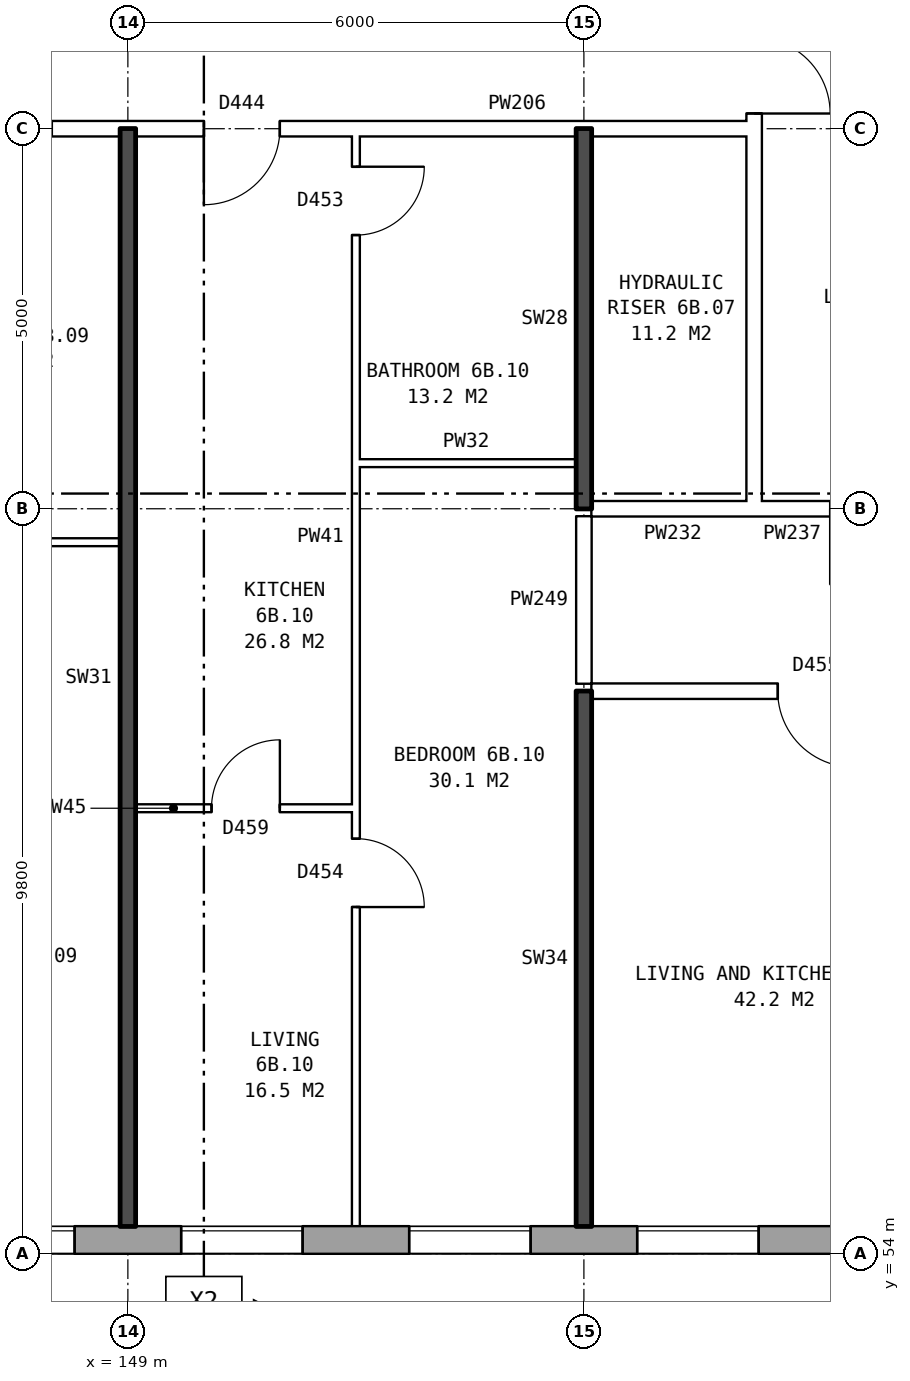
"""IFC4 building model, lengths in metres.
Left out: names, types, materials, properties, quantities, classifications, styles, units other than length and angle.
Written with IfcOpenShell. Run it as: python <this file> out.ifc"""

import sys

from ifc_helpers import new_model, si_unit, direction, frame, frame_2d, origin, place, context, subcontext, project, spatial, rectangle, extrude, element, fill, save


model = new_model("IFC4")
c1 = context("Model", 3, precision=1e-05, world=origin(), true_north=direction((0.0, 1.0)))
c2 = subcontext(c1, "Body", "Model", "MODEL_VIEW")
j1 = project(units=[si_unit("LENGTHUNIT", "METRE"), si_unit("PLANEANGLEUNIT", "RADIAN")], contexts=[c1])
p1 = place(None, origin())
s1 = spatial("IfcSite", under=j1, at=p1, CompositionType="ELEMENT")
p2 = place(p1, origin())
s2 = spatial("IfcBuilding", under=s1, at=p2, CompositionType="ELEMENT")
p3 = place(p2, frame((0.0, 0.0, 25.7)))
s3 = spatial("IfcBuildingStorey", under=s2, at=p3, CompositionType="ELEMENT", Elevation=25.7)
p4 = place(p3, frame((134.075, 54.18, 0.0), z_axis=(0.0, 0.0, 1.0), x_axis=(1.0, 0.0, 0.0)))
e1 = element("IfcWall", 1, at=p4, inside=s3, PredefinedType="STANDARD", context=c2, shape_type="SweptSolid", body=[
    extrude(rectangle(XDim=40.601, YDim=0.36, at=frame_2d((20.3, 0.0))), origin(), (0.0, 0.0, 1.0), 2.85),
])
p5 = place(p4, frame((0.625, 0.0, 0.8)))
e2 = element("IfcOpeningElement", 2, at=p5, cuts=e1, PredefinedType="OPENING", context=c2, shape_type="SweptSolid", body=[
    extrude(rectangle(XDim=1.6, YDim=1.8, at=frame_2d((0.8, 0.9))), frame((0.0, 0.19, 0.0), z_axis=(0.0, -1.0, 0.0), x_axis=(1.0, 0.0, 0.0)), (0.0, 0.0, 1.0), 0.38),
])
p6 = place(p4, frame((3.625, 0.0, 0.8)))
e3 = element("IfcOpeningElement", 3, at=p6, cuts=e1, PredefinedType="OPENING", context=c2, shape_type="SweptSolid", body=[
    extrude(rectangle(XDim=1.6, YDim=1.8, at=frame_2d((0.8, 0.9))), frame((0.0, 0.19, 0.0), z_axis=(0.0, -1.0, 0.0), x_axis=(1.0, 0.0, 0.0)), (0.0, 0.0, 1.0), 0.38),
])
p7 = place(p4, frame((5.525, 0.0, 1.7)))
e4 = element("IfcOpeningElement", 4, at=p7, cuts=e1, PredefinedType="OPENING", context=c2, shape_type="SweptSolid", body=[
    extrude(rectangle(XDim=1.2, YDim=0.9, at=frame_2d((0.6, 0.45))), frame((0.0, 0.19, 0.0), z_axis=(0.0, -1.0, 0.0), x_axis=(1.0, 0.0, 0.0)), (0.0, 0.0, 1.0), 0.38),
])
p8 = place(p4, frame((9.625, 0.0, 0.8)))
e5 = element("IfcOpeningElement", 5, at=p8, cuts=e1, PredefinedType="OPENING", context=c2, shape_type="SweptSolid", body=[
    extrude(rectangle(XDim=1.6, YDim=1.8, at=frame_2d((0.8, 0.9))), frame((0.0, 0.19, 0.0), z_axis=(0.0, -1.0, 0.0), x_axis=(1.0, 0.0, 0.0)), (0.0, 0.0, 1.0), 0.38),
])
p9 = place(p4, frame((12.625, 0.0, 0.8)))
e6 = element("IfcOpeningElement", 6, at=p9, cuts=e1, PredefinedType="OPENING", context=c2, shape_type="SweptSolid", body=[
    extrude(rectangle(XDim=1.6, YDim=1.8, at=frame_2d((0.8, 0.9))), frame((0.0, 0.19, 0.0), z_axis=(0.0, -1.0, 0.0), x_axis=(1.0, 0.0, 0.0)), (0.0, 0.0, 1.0), 0.38),
])
p10 = place(p4, frame((15.625, 0.0, 0.8)))
e7 = element("IfcOpeningElement", 7, at=p10, cuts=e1, PredefinedType="OPENING", context=c2, shape_type="SweptSolid", body=[
    extrude(rectangle(XDim=1.6, YDim=1.8, at=frame_2d((0.8, 0.9))), frame((0.0, 0.19, 0.0), z_axis=(0.0, -1.0, 0.0), x_axis=(1.0, 0.0, 0.0)), (0.0, 0.0, 1.0), 0.38),
])
p11 = place(p4, frame((18.625, 0.0, 0.8)))
e8 = element("IfcOpeningElement", 8, at=p11, cuts=e1, PredefinedType="OPENING", context=c2, shape_type="SweptSolid", body=[
    extrude(rectangle(XDim=1.6, YDim=1.8, at=frame_2d((0.8, 0.9))), frame((0.0, 0.19, 0.0), z_axis=(0.0, -1.0, 0.0), x_axis=(1.0, 0.0, 0.0)), (0.0, 0.0, 1.0), 0.38),
])
p12 = place(p4, frame((21.625, 0.0, 0.8)))
e9 = element("IfcOpeningElement", 9, at=p12, cuts=e1, PredefinedType="OPENING", context=c2, shape_type="SweptSolid", body=[
    extrude(rectangle(XDim=1.6, YDim=1.8, at=frame_2d((0.8, 0.9))), frame((0.0, 0.19, 0.0), z_axis=(0.0, -1.0, 0.0), x_axis=(1.0, 0.0, 0.0)), (0.0, 0.0, 1.0), 0.38),
])
p13 = place(p4, frame((24.625, 0.0, 0.8)))
e10 = element("IfcOpeningElement", 10, at=p13, cuts=e1, PredefinedType="OPENING", context=c2, shape_type="SweptSolid", body=[
    extrude(rectangle(XDim=1.6, YDim=1.8, at=frame_2d((0.8, 0.9))), frame((0.0, 0.19, 0.0), z_axis=(0.0, -1.0, 0.0), x_axis=(1.0, 0.0, 0.0)), (0.0, 0.0, 1.0), 0.38),
])
p14 = place(p4, frame((27.625, 0.0, 0.8)))
e11 = element("IfcOpeningElement", 11, at=p14, cuts=e1, PredefinedType="OPENING", context=c2, shape_type="SweptSolid", body=[
    extrude(rectangle(XDim=1.6, YDim=1.8, at=frame_2d((0.8, 0.9))), frame((0.0, 0.19, 0.0), z_axis=(0.0, -1.0, 0.0), x_axis=(1.0, 0.0, 0.0)), (0.0, 0.0, 1.0), 0.38),
])
p15 = place(p4, frame((30.125, 0.0, 0.8)))
e12 = element("IfcOpeningElement", 12, at=p15, cuts=e1, PredefinedType="OPENING", context=c2, shape_type="SweptSolid", body=[
    extrude(rectangle(XDim=1.2, YDim=1.8, at=frame_2d((0.6, 0.9))), frame((0.0, 0.19, 0.0), z_axis=(0.0, -1.0, 0.0), x_axis=(1.0, 0.0, 0.0)), (0.0, 0.0, 1.0), 0.38),
])
p16 = place(p4, frame((33.825, 0.0, 1.7)))
e13 = element("IfcOpeningElement", 13, at=p16, cuts=e1, PredefinedType="OPENING", context=c2, shape_type="SweptSolid", body=[
    extrude(rectangle(XDim=1.0, YDim=0.9, at=frame_2d((0.5, 0.45))), frame((0.0, 0.19, 0.0), z_axis=(0.0, -1.0, 0.0), x_axis=(1.0, 0.0, 0.0)), (0.0, 0.0, 1.0), 0.38),
])
p17 = place(p4, frame((36.625, 0.0, 0.8)))
e14 = element("IfcOpeningElement", 14, at=p17, cuts=e1, PredefinedType="OPENING", context=c2, shape_type="SweptSolid", body=[
    extrude(rectangle(XDim=1.6, YDim=1.8, at=frame_2d((0.8, 0.9))), frame((0.0, 0.19, 0.0), z_axis=(0.0, -1.0, 0.0), x_axis=(1.0, 0.0, 0.0)), (0.0, 0.0, 1.0), 0.38),
])
p18 = place(p4, frame((8.025, 0.0, 0.8)))
e15 = element("IfcOpeningElement", 15, at=p18, cuts=e1, PredefinedType="OPENING", context=c2, shape_type="SweptSolid", body=[
    extrude(rectangle(XDim=0.6, YDim=0.9, at=frame_2d((0.3, 0.45))), frame((0.0, 0.19, 0.0), z_axis=(0.0, -1.0, 0.0), x_axis=(1.0, 0.0, 0.0)), (0.0, 0.0, 1.0), 0.38),
])
p19 = place(p4, frame((31.625, 0.0, 0.8)))
e16 = element("IfcOpeningElement", 16, at=p19, cuts=e1, PredefinedType="OPENING", context=c2, shape_type="SweptSolid", body=[
    extrude(rectangle(XDim=0.6, YDim=1.2, at=frame_2d((0.3, 0.6))), frame((0.0, 0.19, 0.0), z_axis=(0.0, -1.0, 0.0), x_axis=(1.0, 0.0, 0.0)), (0.0, 0.0, 1.0), 0.38),
])
p20 = place(p4, frame((35.125, 0.0, 0.8)))
e17 = element("IfcOpeningElement", 17, at=p20, cuts=e1, PredefinedType="OPENING", context=c2, shape_type="SweptSolid", body=[
    extrude(rectangle(XDim=1.2, YDim=1.8, at=frame_2d((0.6, 0.9))), frame((0.0, 0.19, 0.0), z_axis=(0.0, -1.0, 0.0), x_axis=(1.0, 0.0, 0.0)), (0.0, 0.0, 1.0), 0.38),
])
p21 = place(p3, frame((157.24, 63.9, 0.0), z_axis=(0.0, 0.0, 1.0), x_axis=(0.0, 1.0, 0.0)))
e18 = element("IfcWall", 18, at=p21, inside=s3, PredefinedType="PARTITIONING", context=c2, shape_type="SweptSolid", body=[
    extrude(rectangle(XDim=12.2, YDim=0.2, at=frame_2d((6.1, 0.0))), origin(), (0.0, 0.0, 1.0), 2.85),
])
p22 = place(p21, frame((5.1, 0.0, 0.0)))
e19 = element("IfcOpeningElement", 19, at=p22, cuts=e18, PredefinedType="OPENING", context=c2, shape_type="SweptSolid", body=[
    extrude(rectangle(XDim=2.0, YDim=2.1, at=frame_2d((1.0, 1.05))), frame((0.0, 0.11, 0.0), z_axis=(0.0, -1.0, 0.0), x_axis=(1.0, 0.0, 0.0)), (0.0, 0.0, 1.0), 0.22),
])
p23 = place(p3, frame((149.1, 59.86, 0.0), z_axis=(0.0, 0.0, 1.0), x_axis=(1.0, 0.0, 0.0)))
e20 = element("IfcWall", 20, at=p23, inside=s3, PredefinedType="PARTITIONING", context=c2, shape_type="SweptSolid", body=[
    extrude(rectangle(XDim=2.9, YDim=0.1, at=frame_2d((1.45, 0.0))), origin(), (0.0, 0.0, 1.0), 2.85),
])
p24 = place(p23, frame((1.0, 0.0, 0.0)))
e21 = element("IfcOpeningElement", 21, at=p24, cuts=e20, PredefinedType="OPENING", context=c2, shape_type="SweptSolid", body=[
    extrude(rectangle(XDim=0.9, YDim=2.1, at=frame_2d((0.45, 1.05))), frame((0.0, 0.06, 0.0), z_axis=(0.0, -1.0, 0.0), x_axis=(1.0, 0.0, 0.0)), (0.0, 0.0, 1.0), 0.12),
])
p25 = place(p3, frame((155.1, 61.4, 0.0), z_axis=(0.0, 0.0, 1.0), x_axis=(1.0, 0.0, 0.0)))
e22 = element("IfcWall", 22, at=p25, inside=s3, PredefinedType="PARTITIONING", context=c2, shape_type="SweptSolid", body=[
    extrude(rectangle(XDim=22.29, YDim=0.2, at=frame_2d((11.145, 0.0))), origin(), (0.0, 0.0, 1.0), 2.85),
])
p26 = place(p25, frame((2.45, 0.0, 0.0)))
e23 = element("IfcOpeningElement", 23, at=p26, cuts=e22, PredefinedType="OPENING", context=c2, shape_type="SweptSolid", body=[
    extrude(rectangle(XDim=1.0, YDim=2.1, at=frame_2d((0.5, 1.05))), frame((0.0, 0.11, 0.0), z_axis=(0.0, -1.0, 0.0), x_axis=(1.0, 0.0, 0.0)), (0.0, 0.0, 1.0), 0.22),
])
p27 = place(p25, frame((14.4, 0.0, 0.0)))
e24 = element("IfcOpeningElement", 24, at=p27, cuts=e22, PredefinedType="OPENING", context=c2, shape_type="SweptSolid", body=[
    extrude(rectangle(XDim=1.0, YDim=2.1, at=frame_2d((0.5, 1.05))), frame((0.0, 0.11, 0.0), z_axis=(0.0, -1.0, 0.0), x_axis=(1.0, 0.0, 0.0)), (0.0, 0.0, 1.0), 0.22),
])
p28 = place(p3, frame((146.0, 63.36, 0.0), z_axis=(0.0, 0.0, 1.0), x_axis=(1.0, 0.0, 0.0)))
e25 = element("IfcWall", 25, at=p28, inside=s3, PredefinedType="PARTITIONING", context=c2, shape_type="SweptSolid", body=[
    extrude(rectangle(XDim=2.9, YDim=0.1, at=frame_2d((1.45, 0.0))), origin(), (0.0, 0.0, 1.0), 2.85),
])
p29 = place(p28, frame((1.0, 0.0, 0.0)))
e26 = element("IfcOpeningElement", 26, at=p29, cuts=e25, PredefinedType="OPENING", context=c2, shape_type="SweptSolid", body=[
    extrude(rectangle(XDim=0.9, YDim=2.1, at=frame_2d((0.45, 1.05))), frame((0.0, 0.06, 0.0), z_axis=(0.0, -1.0, 0.0), x_axis=(1.0, 0.0, 0.0)), (0.0, 0.0, 1.0), 0.12),
])
p30 = place(p3, frame((155.1, 63.8, 0.0), z_axis=(0.0, 0.0, 1.0), x_axis=(1.0, 0.0, 0.0)))
e27 = element("IfcWall", 27, at=p30, inside=s3, PredefinedType="PARTITIONING", context=c2, shape_type="SweptSolid", body=[
    extrude(rectangle(XDim=2.14, YDim=0.2, at=frame_2d((1.07, 0.0))), origin(), (0.0, 0.0, 1.0), 2.85),
])
p31 = place(p3, frame((157.24, 63.8, 0.0), z_axis=(0.0, 0.0, 1.0), x_axis=(1.0, 0.0, 0.0)))
e28 = element("IfcWall", 28, at=p31, inside=s3, PredefinedType="PARTITIONING", context=c2, shape_type="SweptSolid", body=[
    extrude(rectangle(XDim=3.0, YDim=0.2, at=frame_2d((1.5, 0.0))), origin(), (0.0, 0.0, 1.0), 2.85),
])
p32 = place(p31, frame((1.0, 0.0, 0.0)))
e29 = element("IfcOpeningElement", 29, at=p32, cuts=e28, PredefinedType="OPENING", context=c2, shape_type="SweptSolid", body=[
    extrude(rectangle(XDim=1.0, YDim=2.1, at=frame_2d((0.5, 1.05))), frame((0.0, 0.11, 0.0), z_axis=(0.0, -1.0, 0.0), x_axis=(1.0, 0.0, 0.0)), (0.0, 0.0, 1.0), 0.22),
])
p33 = place(p3, frame((152.0, 64.4, 0.0), z_axis=(0.0, 0.0, 1.0), x_axis=(1.0, 0.0, 0.0)))
e30 = element("IfcWall", 30, at=p33, inside=s3, PredefinedType="PARTITIONING", context=c2, shape_type="SweptSolid", body=[
    extrude(rectangle(XDim=2.9, YDim=0.1, at=frame_2d((1.45, 0.0))), origin(), (0.0, 0.0, 1.0), 2.85),
])
p34 = place(p3, frame((142.76, 68.8, 0.0), z_axis=(0.0, 0.0, 1.0), x_axis=(1.0, 0.0, 0.0)))
e31 = element("IfcWall", 31, at=p34, inside=s3, PredefinedType="PARTITIONING", context=c2, shape_type="SweptSolid", body=[
    extrude(rectangle(XDim=14.48, YDim=0.2, at=frame_2d((7.24, 0.0))), origin(), (0.0, 0.0, 1.0), 2.85),
])
p35 = place(p34, frame((4.24, 0.0, 0.0)))
e32 = element("IfcOpeningElement", 32, at=p35, cuts=e31, PredefinedType="OPENING", context=c2, shape_type="SweptSolid", body=[
    extrude(rectangle(XDim=1.0, YDim=2.1, at=frame_2d((0.5, 1.05))), frame((0.0, 0.11, 0.0), z_axis=(0.0, -1.0, 0.0), x_axis=(1.0, 0.0, 0.0)), (0.0, 0.0, 1.0), 0.22),
])
p36 = place(p34, frame((7.24, 0.0, 0.0)))
e33 = element("IfcOpeningElement", 33, at=p36, cuts=e31, PredefinedType="OPENING", context=c2, shape_type="SweptSolid", body=[
    extrude(rectangle(XDim=1.0, YDim=2.1, at=frame_2d((0.5, 1.05))), frame((0.0, 0.11, 0.0), z_axis=(0.0, -1.0, 0.0), x_axis=(1.0, 0.0, 0.0)), (0.0, 0.0, 1.0), 0.22),
])
p37 = place(p3, frame((149.0, 54.36, 0.0), z_axis=(0.0, 0.0, 1.0), x_axis=(0.0, 1.0, 0.0)))
e34 = element("IfcWall", 34, at=p37, inside=s3, PredefinedType="SOLIDWALL", context=c2, shape_type="SweptSolid", body=[
    extrude(rectangle(XDim=14.44, YDim=0.2, at=frame_2d((7.22, 0.0))), origin(), (0.0, 0.0, 1.0), 2.85),
])
p38 = place(p3, frame((152.0, 54.36, 0.0), z_axis=(0.0, 0.0, 1.0), x_axis=(0.0, 1.0, 0.0)))
e35 = element("IfcWall", 35, at=p38, inside=s3, PredefinedType="PARTITIONING", context=c2, shape_type="SweptSolid", body=[
    extrude(rectangle(XDim=14.34, YDim=0.1, at=frame_2d((7.17, 0.0))), origin(), (0.0, 0.0, 1.0), 2.85),
])
p39 = place(p38, frame((4.2, 0.0, 0.0)))
e36 = element("IfcOpeningElement", 36, at=p39, cuts=e35, PredefinedType="OPENING", context=c2, shape_type="SweptSolid", body=[
    extrude(rectangle(XDim=0.9, YDim=2.1, at=frame_2d((0.45, 1.05))), frame((0.0, 0.06, 0.0), z_axis=(0.0, -1.0, 0.0), x_axis=(1.0, 0.0, 0.0)), (0.0, 0.0, 1.0), 0.12),
])
p40 = place(p38, frame((13.04, 0.0, 0.0)))
e37 = element("IfcOpeningElement", 37, at=p40, cuts=e35, PredefinedType="OPENING", context=c2, shape_type="SweptSolid", body=[
    extrude(rectangle(XDim=0.9, YDim=2.1, at=frame_2d((0.45, 1.05))), frame((0.0, 0.06, 0.0), z_axis=(0.0, -1.0, 0.0), x_axis=(1.0, 0.0, 0.0)), (0.0, 0.0, 1.0), 0.12),
])
p41 = place(p3, frame((155.0, 54.36, 0.0), z_axis=(0.0, 0.0, 1.0), x_axis=(0.0, 1.0, 0.0)))
e38 = element("IfcWall", 38, at=p41, inside=s3, PredefinedType="SOLIDWALL", context=c2, shape_type="SweptSolid", body=[
    extrude(rectangle(XDim=7.04, YDim=0.2, at=frame_2d((3.52, 0.0))), origin(), (0.0, 0.0, 1.0), 2.85),
])
p42 = place(p3, frame((155.0, 61.5, 0.0), z_axis=(0.0, 0.0, 1.0), x_axis=(0.0, 1.0, 0.0)))
e39 = element("IfcWall", 39, at=p42, inside=s3, PredefinedType="PARTITIONING", context=c2, shape_type="SweptSolid", body=[
    extrude(rectangle(XDim=2.2, YDim=0.2, at=frame_2d((1.1, 0.0))), origin(), (0.0, 0.0, 1.0), 2.85),
])
p43 = place(p3, frame((155.0, 63.8, 0.0), z_axis=(0.0, 0.0, 1.0), x_axis=(0.0, 1.0, 0.0)))
e40 = element("IfcWall", 40, at=p43, inside=s3, PredefinedType="SOLIDWALL", context=c2, shape_type="SweptSolid", body=[
    extrude(rectangle(XDim=5.0, YDim=0.2, at=frame_2d((2.5, 0.0))), origin(), (0.0, 0.0, 1.0), 2.85),
])
p44 = place(p9, origin())
e41 = element("IfcWindow", 41, at=p44, inside=s3, PartitioningType="SINGLE_PANEL", PredefinedType="WINDOW", context=c2, shape_type="SweptSolid", body=[
    extrude(rectangle(XDim=1.6, YDim=1.8, at=frame_2d((0.8, 0.9))), frame((0.0, 0.15, 0.0), z_axis=(0.0, -1.0, 0.0), x_axis=(1.0, 0.0, 0.0)), (0.0, 0.0, 1.0), 0.06),
])
fill(e6, e41)
p45 = place(p10, origin())
e42 = element("IfcWindow", 42, at=p45, inside=s3, PartitioningType="SINGLE_PANEL", PredefinedType="WINDOW", context=c2, shape_type="SweptSolid", body=[
    extrude(rectangle(XDim=1.6, YDim=1.8, at=frame_2d((0.8, 0.9))), frame((0.0, 0.15, 0.0), z_axis=(0.0, -1.0, 0.0), x_axis=(1.0, 0.0, 0.0)), (0.0, 0.0, 1.0), 0.06),
])
fill(e7, e42)
p46 = place(p11, origin())
e43 = element("IfcWindow", 43, at=p46, inside=s3, PartitioningType="SINGLE_PANEL", PredefinedType="WINDOW", context=c2, shape_type="SweptSolid", body=[
    extrude(rectangle(XDim=1.6, YDim=1.8, at=frame_2d((0.8, 0.9))), frame((0.0, 0.15, 0.0), z_axis=(0.0, -1.0, 0.0), x_axis=(1.0, 0.0, 0.0)), (0.0, 0.0, 1.0), 0.06),
])
fill(e8, e43)
p47 = place(p12, origin())
e44 = element("IfcWindow", 44, at=p47, inside=s3, PartitioningType="SINGLE_PANEL", PredefinedType="WINDOW", context=c2, shape_type="SweptSolid", body=[
    extrude(rectangle(XDim=1.6, YDim=1.8, at=frame_2d((0.8, 0.9))), frame((0.0, 0.15, 0.0), z_axis=(0.0, -1.0, 0.0), x_axis=(1.0, 0.0, 0.0)), (0.0, 0.0, 1.0), 0.06),
])
fill(e9, e44)
p48 = place(p22, frame((2.0, 0.0, 0.0), z_axis=(0.0, 0.0, 1.0), x_axis=(-1.0, 0.0, 0.0)))
e45 = element("IfcDoor", 45, at=p48, inside=s3, OperationType="DOUBLE_DOOR_SINGLE_SWING", PredefinedType="DOOR", context=c2, shape_type="SweptSolid", body=[
    extrude(rectangle(XDim=2.0, YDim=2.1, at=frame_2d((1.0, 1.05))), frame((0.0, 0.025, 0.0), z_axis=(0.0, -1.0, 0.0), x_axis=(1.0, 0.0, 0.0)), (0.0, 0.0, 1.0), 0.05),
])
fill(e19, e45)
p49 = place(p39, frame((0.9, 0.0, 0.0), z_axis=(0.0, 0.0, 1.0), x_axis=(-1.0, 0.0, 0.0)))
e46 = element("IfcDoor", 46, at=p49, inside=s3, OperationType="SINGLE_SWING_RIGHT", PredefinedType="DOOR", context=c2, shape_type="SweptSolid", body=[
    extrude(rectangle(XDim=0.9, YDim=2.1, at=frame_2d((0.45, 1.05))), frame((0.0, 0.025, 0.0), z_axis=(0.0, -1.0, 0.0), x_axis=(1.0, 0.0, 0.0)), (0.0, 0.0, 1.0), 0.05),
])
fill(e36, e46)
p50 = place(p36, frame((1.0, 0.0, 0.0), z_axis=(0.0, 0.0, 1.0), x_axis=(-1.0, 0.0, 0.0)))
e47 = element("IfcDoor", 47, at=p50, inside=s3, OperationType="SINGLE_SWING_RIGHT", PredefinedType="DOOR", context=c2, shape_type="SweptSolid", body=[
    extrude(rectangle(XDim=1.0, YDim=2.1, at=frame_2d((0.5, 1.05))), frame((0.0, 0.025, 0.0), z_axis=(0.0, -1.0, 0.0), x_axis=(1.0, 0.0, 0.0)), (0.0, 0.0, 1.0), 0.05),
])
fill(e33, e47)
p51 = place(p24, origin())
e48 = element("IfcDoor", 48, at=p51, inside=s3, OperationType="SINGLE_SWING_RIGHT", PredefinedType="DOOR", context=c2, shape_type="SweptSolid", body=[
    extrude(rectangle(XDim=0.9, YDim=2.1, at=frame_2d((0.45, 1.05))), frame((0.0, 0.025, 0.0), z_axis=(0.0, -1.0, 0.0), x_axis=(1.0, 0.0, 0.0)), (0.0, 0.0, 1.0), 0.05),
])
fill(e21, e48)
p52 = place(p40, frame((0.9, 0.0, 0.0), z_axis=(0.0, 0.0, 1.0), x_axis=(-1.0, 0.0, 0.0)))
e49 = element("IfcDoor", 49, at=p52, inside=s3, OperationType="SINGLE_SWING_LEFT", PredefinedType="DOOR", context=c2, shape_type="SweptSolid", body=[
    extrude(rectangle(XDim=0.9, YDim=2.1, at=frame_2d((0.45, 1.05))), frame((0.0, 0.025, 0.0), z_axis=(0.0, -1.0, 0.0), x_axis=(1.0, 0.0, 0.0)), (0.0, 0.0, 1.0), 0.05),
])
fill(e37, e49)
p53 = place(p26, frame((1.0, 0.0, 0.0), z_axis=(0.0, 0.0, 1.0), x_axis=(-1.0, 0.0, 0.0)))
e50 = element("IfcDoor", 50, at=p53, inside=s3, OperationType="SINGLE_SWING_LEFT", PredefinedType="DOOR", context=c2, shape_type="SweptSolid", body=[
    extrude(rectangle(XDim=1.0, YDim=2.1, at=frame_2d((0.5, 1.05))), frame((0.0, 0.025, 0.0), z_axis=(0.0, -1.0, 0.0), x_axis=(1.0, 0.0, 0.0)), (0.0, 0.0, 1.0), 0.05),
])
fill(e23, e50)
save(model, sys.argv[1])
